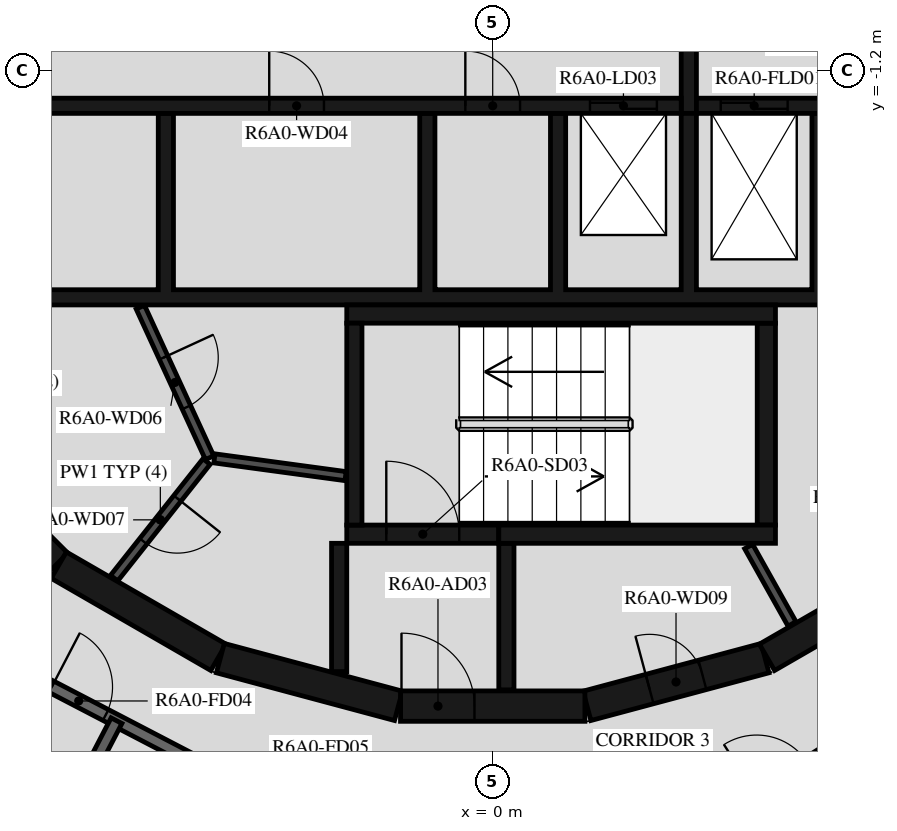
"""IFC4 building model, lengths in metres.
Left out: names, types, materials, properties, quantities, classifications, styles, units other than length and angle.
Written with IfcOpenShell. Run it as: python <this file> out.ifc"""

import sys

from ifc_helpers import new_model, si_unit, direction, frame, frame_2d, origin, place, context, subcontext, project, spatial, polyline, rectangle, outline, extrude, element, fill, save


model = new_model("IFC4")
c1 = context("Model", 3, precision=1e-05, world=origin(), true_north=direction((0.0, 1.0)))
c2 = subcontext(c1, "Body", "Model", "MODEL_VIEW")
j1 = project(units=[si_unit("LENGTHUNIT", "METRE"), si_unit("PLANEANGLEUNIT", "RADIAN")], contexts=[c1])
p1 = place(None, origin())
s1 = spatial("IfcSite", under=j1, at=p1, CompositionType="ELEMENT")
p2 = place(p1, origin())
s2 = spatial("IfcBuilding", under=s1, at=p2, CompositionType="ELEMENT")
p3 = place(p2, frame((0.0, 0.0, 226.7)))
s3 = spatial("IfcBuildingStorey", under=s2, at=p3, CompositionType="ELEMENT", Elevation=226.7)
p4 = place(p3, frame((1.55, -11.643, 0.0), z_axis=(0.0, 0.0, 1.0), x_axis=(0.965948410781, 0.258734743916, 0.0)))
e1 = element("IfcWall", 1, at=p4, inside=s3, PredefinedType="SHEAR", context=c2, shape_type="SweptSolid", body=[
    extrude(rectangle(XDim=3.033, YDim=0.5, at=frame_2d((1.516, 0.0))), origin(), (0.0, 0.0, 1.0), 3.12),
])
p5 = place(p4, frame((1.066, 0.0, 0.0)))
e2 = element("IfcOpeningElement", 2, at=p5, cuts=e1, PredefinedType="OPENING", context=c2, shape_type="SweptSolid", body=[
    extrude(rectangle(XDim=0.9, YDim=2.1, at=frame_2d((0.45, 1.05))), frame((0.0, 0.26, 0.0), z_axis=(0.0, -1.0, 0.0), x_axis=(1.0, 0.0, 0.0)), (0.0, 0.0, 1.0), 0.52),
])
p6 = place(p3, frame((4.51, -10.845, 0.0), z_axis=(0.0, 0.0, 1.0), x_axis=(0.865975092491, 0.500087131594, 0.0)))
e3 = element("IfcWall", 3, at=p6, inside=s3, PredefinedType="SHEAR", context=c2, shape_type="SweptSolid", body=[
    extrude(rectangle(XDim=3.033, YDim=0.5, at=frame_2d((1.516, 0.0))), origin(), (0.0, 0.0, 1.0), 3.12),
])
p7 = place(p3, frame((-9.308, -7.164, 0.0), z_axis=(0.0, 0.0, 1.0), x_axis=(0.707106781187, -0.707106781187, 0.0)))
e4 = element("IfcWall", 4, at=p7, inside=s3, PredefinedType="SHEAR", context=c2, shape_type="SweptSolid", body=[
    extrude(rectangle(XDim=3.032, YDim=0.5, at=frame_2d((1.516, 0.0))), origin(), (0.0, 0.0, 1.0), 3.12),
])
for number, where, z_axis, x_axis in (
    (5, (-7.137, -9.329, 0.0), (0.0, 0.0, 1.0), (0.866, -0.5, 0.0)),
    (6, (-4.479, -10.858, 0.0), (0.0, 0.0, 1.0), (0.966, -0.259, 0.0)),
):
    element("IfcWall", number, at=place(p3, frame(where, z_axis=z_axis, x_axis=x_axis)), inside=s3, PredefinedType="SHEAR", context=c2, shape_type="SweptSolid", body=[
        extrude(rectangle(XDim=3.033, YDim=0.5, at=frame_2d((1.516, 0.0))), origin(), (0.0, 0.0, 1.0), 3.12),
    ])
p8 = place(p3, frame((-1.516, -11.647, 0.0), z_axis=(0.0, 0.0, 1.0), x_axis=(1.0, 0.0, 0.0)))
e7 = element("IfcWall", 7, at=p8, inside=s3, PredefinedType="SHEAR", context=c2, shape_type="SweptSolid", body=[
    extrude(rectangle(XDim=3.033, YDim=0.5, at=frame_2d((1.516, 0.0))), origin(), (0.0, 0.0, 1.0), 3.12),
])
p9 = place(p8, frame((0.016, 0.0, 0.0)))
e8 = element("IfcOpeningElement", 8, at=p9, cuts=e7, PredefinedType="OPENING", context=c2, shape_type="SweptSolid", body=[
    extrude(rectangle(XDim=1.2, YDim=2.1, at=frame_2d((0.6, 1.05))), frame((0.0, 0.26, 0.0), z_axis=(0.0, -1.0, 0.0), x_axis=(1.0, 0.0, 0.0)), (0.0, 0.0, 1.0), 0.52),
])
p10 = place(p3, frame((-2.275, -8.67, 0.0), z_axis=(0.0, 0.0, 1.0), x_axis=(0.0, 1.0, 0.0)))
e9 = element("IfcWall", 9, at=p10, inside=s3, PredefinedType="SHEAR", context=c2, shape_type="SweptSolid", body=[
    extrude(rectangle(XDim=3.32, YDim=0.25, at=frame_2d((1.66, 0.0))), origin(), (0.0, 0.0, 1.0), 3.12),
])
p11 = place(p3, frame((-2.4, -5.2, 0.0), z_axis=(0.0, 0.0, 1.0), x_axis=(1.0, 0.0, 0.0)))
e10 = element("IfcWall", 10, at=p11, inside=s3, PredefinedType="SHEAR", context=c2, shape_type="SweptSolid", body=[
    extrude(rectangle(XDim=7.05, YDim=0.3, at=frame_2d((3.525, 0.0))), origin(), (0.0, 0.0, 1.0), 3.12),
])
p12 = place(p3, frame((4.5, -8.67, 0.0), z_axis=(0.0, 0.0, 1.0), x_axis=(0.0, 1.0, 0.0)))
e11 = element("IfcWall", 11, at=p12, inside=s3, PredefinedType="SHEAR", context=c2, shape_type="SweptSolid", body=[
    extrude(rectangle(XDim=3.32, YDim=0.3, at=frame_2d((1.66, 0.0))), origin(), (0.0, 0.0, 1.0), 3.12),
])
p13 = place(p3, frame((0.1, -8.82, 0.0), z_axis=(0.0, 0.0, 1.0), x_axis=(1.0, 0.0, 0.0)))
e12 = element("IfcWall", 12, at=p13, inside=s3, PredefinedType="SHEAR", context=c2, shape_type="SweptSolid", body=[
    extrude(rectangle(XDim=4.55, YDim=0.3, at=frame_2d((2.275, 0.0))), origin(), (0.0, 0.0, 1.0), 3.12),
])
p14 = place(p3, frame((-2.4, -8.82, 0.0), z_axis=(0.0, 0.0, 1.0), x_axis=(1.0, 0.0, 0.0)))
e13 = element("IfcWall", 13, at=p14, inside=s3, PredefinedType="SHEAR", context=c2, shape_type="SweptSolid", body=[
    extrude(rectangle(XDim=2.5, YDim=0.3, at=frame_2d((1.25, 0.0))), origin(), (0.0, 0.0, 1.0), 3.12),
])
p15 = place(p14, frame((0.65, 0.0, 0.0)))
e14 = element("IfcOpeningElement", 14, at=p15, cuts=e13, PredefinedType="OPENING", context=c2, shape_type="SweptSolid", body=[
    extrude(rectangle(XDim=1.2, YDim=2.1, at=frame_2d((0.6, 1.05))), frame((0.0, 0.16, 0.0), z_axis=(0.0, -1.0, 0.0), x_axis=(1.0, 0.0, 0.0)), (0.0, 0.0, 1.0), 0.32),
])
p16 = place(p3, frame((-2.525, -8.97, 0.0), z_axis=(0.0, 0.0, 1.0), x_axis=(0.0, -1.0, 0.0)))
e15 = element("IfcWall", 15, at=p16, inside=s3, PredefinedType="SHEAR", context=c2, shape_type="SweptSolid", body=[
    extrude(rectangle(XDim=2.11, YDim=0.25, at=frame_2d((1.055, 0.0))), origin(), (0.0, 0.0, 1.0), 3.12),
])
p17 = place(p3, frame((0.225, -8.97, 0.0), z_axis=(0.0, 0.0, 1.0), x_axis=(0.0, -1.0, 0.0)))
e16 = element("IfcWall", 16, at=p17, inside=s3, PredefinedType="SHEAR", context=c2, shape_type="SweptSolid", body=[
    extrude(rectangle(XDim=2.41, YDim=0.25, at=frame_2d((1.205, 0.0))), origin(), (0.0, 0.0, 1.0), 3.12),
])
p18 = place(p3, origin())
e17 = element("IfcWall", 17, at=p18, inside=s3, PredefinedType="SHEAR", context=c2, shape_type="SweptSolid", body=[
    extrude(outline(polyline([(9.8, -5.05), (9.8, -4.8), (9.8, -1.9), (9.55, -1.9), (9.55, -4.8), (7.65, -4.8), (7.65, -1.9), (7.4, -1.9), (7.4, -4.8), (5.5, -4.8), (5.5, -1.9), (5.25, -1.9), (5.25, -4.8), (3.35, -4.8), (3.35, -1.9), (3.1, -1.9), (3.1, -4.8), (1.2, -4.8), (1.2, -1.9), (0.95, -1.9), (0.95, -4.8), (-0.95, -4.8), (-0.95, -1.9), (-1.2, -1.9), (-1.2, -4.8), (-5.25, -4.8), (-5.25, -1.9), (-5.5, -1.9), (-5.5, -4.8), (-7.4, -4.8), (-7.4, -1.9), (-7.65, -1.9), (-7.65, -4.8), (-9.55, -4.8), (-9.55, -1.9), (-9.8, -1.9), (-9.8, -4.8), (-9.8, -5.05), (9.8, -5.05)])), origin(), (0.0, 0.0, 1.0), 3.12),
])
p19 = place(p3, frame((-11.28, -1.775, 0.0), z_axis=(0.0, 0.0, 1.0), x_axis=(1.0, 0.0, 0.0)))
e18 = element("IfcWall", 18, at=p19, inside=s3, PredefinedType="SHEAR", context=c2, shape_type="SweptSolid", body=[
    extrude(rectangle(XDim=14.38, YDim=0.25, at=frame_2d((7.19, 0.0))), origin(), (0.0, 0.0, 1.0), 3.12),
])
p20 = place(p19, frame((12.88, 0.0, 0.0)))
e19 = element("IfcOpeningElement", 19, at=p20, cuts=e18, PredefinedType="OPENING", context=c2, shape_type="SweptSolid", body=[
    extrude(rectangle(XDim=1.1, YDim=2.1, at=frame_2d((0.55, 1.05))), frame((0.0, 0.135, 0.0), z_axis=(0.0, -1.0, 0.0), x_axis=(1.0, 0.0, 0.0)), (0.0, 0.0, 1.0), 0.27),
])
p21 = place(p19, frame((7.605, 0.0, 0.0)))
e20 = element("IfcOpeningElement", 20, at=p21, cuts=e18, PredefinedType="OPENING", context=c2, shape_type="SweptSolid", body=[
    extrude(rectangle(XDim=0.9, YDim=2.1, at=frame_2d((0.45, 1.05))), frame((0.0, 0.135, 0.0), z_axis=(0.0, -1.0, 0.0), x_axis=(1.0, 0.0, 0.0)), (0.0, 0.0, 1.0), 0.27),
])
p22 = place(p19, frame((10.83, 0.0, 0.0)))
e21 = element("IfcOpeningElement", 21, at=p22, cuts=e18, PredefinedType="OPENING", context=c2, shape_type="SweptSolid", body=[
    extrude(rectangle(XDim=0.9, YDim=2.1, at=frame_2d((0.45, 1.05))), frame((0.0, 0.135, 0.0), z_axis=(0.0, -1.0, 0.0), x_axis=(1.0, 0.0, 0.0)), (0.0, 0.0, 1.0), 0.27),
])
p23 = place(p3, frame((3.35, -1.775, 0.0), z_axis=(0.0, 0.0, 1.0), x_axis=(1.0, 0.0, 0.0)))
e22 = element("IfcWall", 22, at=p23, inside=s3, PredefinedType="SHEAR", context=c2, shape_type="SweptSolid", body=[
    extrude(rectangle(XDim=7.93, YDim=0.25, at=frame_2d((3.965, 0.0))), origin(), (0.0, 0.0, 1.0), 3.12),
])
p24 = place(p23, frame((0.4, 0.0, 0.0)))
e23 = element("IfcOpeningElement", 23, at=p24, cuts=e22, PredefinedType="OPENING", context=c2, shape_type="SweptSolid", body=[
    extrude(rectangle(XDim=1.1, YDim=2.4, at=frame_2d((0.55, 1.2))), frame((0.0, 0.135, 0.0), z_axis=(0.0, -1.0, 0.0), x_axis=(1.0, 0.0, 0.0)), (0.0, 0.0, 1.0), 0.27),
])
p25 = place(p23, frame((2.55, 0.0, 0.0)))
e24 = element("IfcOpeningElement", 24, at=p25, cuts=e22, PredefinedType="OPENING", context=c2, shape_type="SweptSolid", body=[
    extrude(rectangle(XDim=1.1, YDim=2.4, at=frame_2d((0.55, 1.2))), frame((0.0, 0.135, 0.0), z_axis=(0.0, -1.0, 0.0), x_axis=(1.0, 0.0, 0.0)), (0.0, 0.0, 1.0), 0.27),
])
p26 = place(p23, frame((4.7, 0.0, 0.0)))
e25 = element("IfcOpeningElement", 25, at=p26, cuts=e22, PredefinedType="OPENING", context=c2, shape_type="SweptSolid", body=[
    extrude(rectangle(XDim=1.1, YDim=2.4, at=frame_2d((0.55, 1.2))), frame((0.0, 0.135, 0.0), z_axis=(0.0, -1.0, 0.0), x_axis=(1.0, 0.0, 0.0)), (0.0, 0.0, 1.0), 0.27),
])
p27 = place(p3, frame((3.225, -1.9, 0.0), z_axis=(0.0, 0.0, 1.0), x_axis=(0.0, 1.0, 0.0)))
e26 = element("IfcWall", 26, at=p27, inside=s3, PredefinedType="SHEAR", context=c2, shape_type="SweptSolid", body=[
    extrude(rectangle(XDim=3.8, YDim=0.25, at=frame_2d((1.9, 0.0))), origin(), (0.0, 0.0, 1.0), 3.12),
])
p28 = place(p3, frame((4.922, -10.296, 0.0), z_axis=(0.0, 0.0, 1.0), x_axis=(-0.48860846254, 0.872503163509, 0.0)))
e27 = element("IfcWall", 27, at=p28, inside=s3, PredefinedType="PARTITIONING", context=c2, shape_type="SweptSolid", body=[
    extrude(rectangle(XDim=1.459, YDim=0.15, at=frame_2d((0.73, 0.0))), origin(), (0.0, 0.0, 1.0), 3.12),
])
p29 = place(p3, frame((-5.795, -5.086, 0.0), z_axis=(0.0, 0.0, 1.0), x_axis=(0.417887867606, -0.908498613157, 0.0)))
e28 = element("IfcWall", 28, at=p29, inside=s3, PredefinedType="PARTITIONING", context=c2, shape_type="SweptSolid", body=[
    extrude(rectangle(XDim=2.726, YDim=0.15, at=frame_2d((1.363, 0.0))), origin(), (0.0, 0.0, 1.0), 3.12),
])
p30 = place(p29, frame((0.913, 0.0, 0.0)))
e29 = element("IfcOpeningElement", 29, at=p30, cuts=e28, PredefinedType="OPENING", context=c2, shape_type="SweptSolid", body=[
    extrude(rectangle(XDim=0.9, YDim=2.1, at=frame_2d((0.45, 1.05))), frame((0.0, 0.085, 0.0), z_axis=(0.0, -1.0, 0.0), x_axis=(1.0, 0.0, 0.0)), (0.0, 0.0, 1.0), 0.17),
])
p31 = place(p3, frame((-4.706, -7.625, 0.0), z_axis=(0.0, 0.0, 1.0), x_axis=(-0.621392599334, -0.783499353856, 0.0)))
e30 = element("IfcWall", 30, at=p31, inside=s3, PredefinedType="PARTITIONING", context=c2, shape_type="SweptSolid", body=[
    extrude(rectangle(XDim=2.447, YDim=0.15, at=frame_2d((1.224, 0.0))), origin(), (0.0, 0.0, 1.0), 3.12),
])
p32 = place(p31, frame((0.774, 0.0, 0.0)))
e31 = element("IfcOpeningElement", 31, at=p32, cuts=e30, PredefinedType="OPENING", context=c2, shape_type="SweptSolid", body=[
    extrude(rectangle(XDim=0.9, YDim=2.1, at=frame_2d((0.45, 1.05))), frame((0.0, 0.085, 0.0), z_axis=(0.0, -1.0, 0.0), x_axis=(1.0, 0.0, 0.0)), (0.0, 0.0, 1.0), 0.17),
])
p33 = place(p3, frame((-2.42, -7.865, 0.0), z_axis=(0.0, 0.0, 1.0), x_axis=(-0.990972299108, 0.134066783362, 0.0)))
e32 = element("IfcWall", 32, at=p33, inside=s3, PredefinedType="PARTITIONING", context=c2, shape_type="SweptSolid", body=[
    extrude(rectangle(XDim=2.176, YDim=0.15, at=frame_2d((1.088, 0.0))), origin(), (0.0, 0.0, 1.0), 3.12),
])
p34 = place(p3, frame((-9.372, -10.228, 0.0), z_axis=(0.0, 0.0, 1.0), x_axis=(0.887005184532, -0.461759464021, 0.0)))
e33 = element("IfcWall", 33, at=p34, inside=s3, PredefinedType="STANDARD", context=c2, shape_type="SweptSolid", body=[
    extrude(rectangle(XDim=7.181, YDim=0.2, at=frame_2d((3.591, 0.0))), origin(), (0.0, 0.0, 1.0), 3.12),
])
p35 = place(p34, frame((2.391, 0.0, 0.0)))
e34 = element("IfcOpeningElement", 34, at=p35, cuts=e33, PredefinedType="OPENING", context=c2, shape_type="SweptSolid", body=[
    extrude(rectangle(XDim=1.0, YDim=2.1, at=frame_2d((0.5, 1.05))), frame((0.0, 0.11, 0.0), z_axis=(0.0, -1.0, 0.0), x_axis=(1.0, 0.0, 0.0)), (0.0, 0.0, 1.0), 0.22),
])
p36 = place(p3, frame((4.172, -13.231, 0.0), z_axis=(0.0, 0.0, 1.0), x_axis=(0.843388394728, 0.537304397561, 0.0)))
e35 = element("IfcWall", 35, at=p36, inside=s3, PredefinedType="STANDARD", context=c2, shape_type="SweptSolid", body=[
    extrude(rectangle(XDim=7.181, YDim=0.2, at=frame_2d((3.59, 0.0))), origin(), (0.0, 0.0, 1.0), 3.12),
])
p37 = place(p36, frame((0.2, 0.0, 0.0)))
e36 = element("IfcOpeningElement", 36, at=p37, cuts=e35, PredefinedType="OPENING", context=c2, shape_type="SweptSolid", body=[
    extrude(rectangle(XDim=1.0, YDim=2.1, at=frame_2d((0.5, 1.05))), frame((0.0, 0.11, 0.0), z_axis=(0.0, -1.0, 0.0), x_axis=(1.0, 0.0, 0.0)), (0.0, 0.0, 1.0), 0.22),
])
p38 = place(p3, frame((-8.326, -15.996, 0.0), z_axis=(0.0, 0.0, 1.0), x_axis=(0.461739255077, 0.887015704664, 0.0)))
e37 = element("IfcWall", 37, at=p38, inside=s3, PredefinedType="STANDARD", context=c2, shape_type="SweptSolid", body=[
    extrude(rectangle(XDim=4.633, YDim=0.2, at=frame_2d((2.317, 0.0))), origin(), (0.0, 0.0, 1.0), 3.12),
])
p39 = place(p3, frame((-10.421, -11.373, 0.0), z_axis=(0.0, 0.0, 1.0), x_axis=(0.887006451745, -0.461757029792, 0.0)))
e38 = element("IfcWall", 38, at=p39, inside=s3, PredefinedType="PARTITIONING", context=c2, shape_type="SweptSolid", body=[
    extrude(rectangle(XDim=3.992, YDim=0.12, at=frame_2d((1.996, 0.0))), origin(), (0.0, 0.0, 1.0), 3.12),
])
p40 = place(p39, frame((0.639, 0.0, 0.0)))
e39 = element("IfcOpeningElement", 39, at=p40, cuts=e38, PredefinedType="OPENING", context=c2, shape_type="SweptSolid", body=[
    extrude(rectangle(XDim=0.9, YDim=2.1, at=frame_2d((0.45, 1.05))), frame((0.0, 0.07, 0.0), z_axis=(0.0, -1.0, 0.0), x_axis=(1.0, 0.0, 0.0)), (0.0, 0.0, 1.0), 0.14),
])
p41 = place(p3, frame((4.83, -14.59, 0.0), z_axis=(0.0, 0.0, 1.0), x_axis=(0.843393042763, 0.537297101629, 0.0)))
e40 = element("IfcWall", 40, at=p41, inside=s3, PredefinedType="PARTITIONING", context=c2, shape_type="SweptSolid", body=[
    extrude(rectangle(XDim=7.53, YDim=0.12, at=frame_2d((3.765, 0.0))), origin(), (0.0, 0.0, 1.0), 3.12),
])
p42 = place(p41, frame((0.2, 0.0, 0.0)))
e41 = element("IfcOpeningElement", 41, at=p42, cuts=e40, PredefinedType="OPENING", context=c2, shape_type="SweptSolid", body=[
    extrude(rectangle(XDim=0.9, YDim=2.1, at=frame_2d((0.45, 1.05))), frame((0.0, 0.07, 0.0), z_axis=(0.0, -1.0, 0.0), x_axis=(1.0, 0.0, 0.0)), (0.0, 0.0, 1.0), 0.14),
])
p43 = place(p15, origin())
e42 = element("IfcDoor", 42, at=p43, inside=s3, OperationType="SINGLE_SWING_LEFT", PredefinedType="DOOR", context=c2, shape_type="SweptSolid", body=[
    extrude(rectangle(XDim=1.2, YDim=2.1, at=frame_2d((0.6, 1.05))), frame((0.0, 0.025, 0.0), z_axis=(0.0, -1.0, 0.0), x_axis=(1.0, 0.0, 0.0)), (0.0, 0.0, 1.0), 0.05),
])
fill(e14, e42)
p44 = place(p9, origin())
e43 = element("IfcDoor", 43, at=p44, inside=s3, OperationType="SINGLE_SWING_RIGHT", PredefinedType="DOOR", context=c2, shape_type="SweptSolid", body=[
    extrude(rectangle(XDim=1.2, YDim=2.1, at=frame_2d((0.6, 1.05))), frame((0.0, 0.025, 0.0), z_axis=(0.0, -1.0, 0.0), x_axis=(1.0, 0.0, 0.0)), (0.0, 0.0, 1.0), 0.05),
])
fill(e8, e43)
p45 = place(p20, origin())
e44 = element("IfcDoor", 44, at=p45, inside=s3, OperationType="DOUBLE_DOOR_SLIDING", PredefinedType="DOOR", context=c2, shape_type="SweptSolid", body=[
    extrude(rectangle(XDim=1.1, YDim=2.1, at=frame_2d((0.55, 1.05))), frame((0.0, 0.025, 0.0), z_axis=(0.0, -1.0, 0.0), x_axis=(1.0, 0.0, 0.0)), (0.0, 0.0, 1.0), 0.05),
])
fill(e19, e44)
p46 = place(p24, origin())
e45 = element("IfcDoor", 45, at=p46, inside=s3, OperationType="DOUBLE_DOOR_SLIDING", PredefinedType="DOOR", context=c2, shape_type="SweptSolid", body=[
    extrude(rectangle(XDim=1.1, YDim=2.4, at=frame_2d((0.55, 1.2))), frame((0.0, 0.025, 0.0), z_axis=(0.0, -1.0, 0.0), x_axis=(1.0, 0.0, 0.0)), (0.0, 0.0, 1.0), 0.05),
])
fill(e23, e45)
p47 = place(p21, origin())
e46 = element("IfcDoor", 46, at=p47, inside=s3, OperationType="SINGLE_SWING_RIGHT", PredefinedType="DOOR", context=c2, shape_type="SweptSolid", body=[
    extrude(rectangle(XDim=0.9, YDim=2.1, at=frame_2d((0.45, 1.05))), frame((0.0, 0.025, 0.0), z_axis=(0.0, -1.0, 0.0), x_axis=(1.0, 0.0, 0.0)), (0.0, 0.0, 1.0), 0.05),
])
fill(e20, e46)
p48 = place(p22, origin())
e47 = element("IfcDoor", 47, at=p48, inside=s3, OperationType="SINGLE_SWING_LEFT", PredefinedType="DOOR", context=c2, shape_type="SweptSolid", body=[
    extrude(rectangle(XDim=0.9, YDim=2.1, at=frame_2d((0.45, 1.05))), frame((0.0, 0.025, 0.0), z_axis=(0.0, -1.0, 0.0), x_axis=(1.0, 0.0, 0.0)), (0.0, 0.0, 1.0), 0.05),
])
fill(e21, e47)
p49 = place(p30, origin())
e48 = element("IfcDoor", 48, at=p49, inside=s3, OperationType="SINGLE_SWING_RIGHT", PredefinedType="DOOR", context=c2, shape_type="SweptSolid", body=[
    extrude(rectangle(XDim=0.9, YDim=2.1, at=frame_2d((0.45, 1.05))), frame((0.0, 0.025, 0.0), z_axis=(0.0, -1.0, 0.0), x_axis=(1.0, 0.0, 0.0)), (0.0, 0.0, 1.0), 0.05),
])
fill(e29, e48)
p50 = place(p32, origin())
e49 = element("IfcDoor", 49, at=p50, inside=s3, OperationType="SINGLE_SWING_LEFT", PredefinedType="DOOR", context=c2, shape_type="SweptSolid", body=[
    extrude(rectangle(XDim=0.9, YDim=2.1, at=frame_2d((0.45, 1.05))), frame((0.0, 0.025, 0.0), z_axis=(0.0, -1.0, 0.0), x_axis=(1.0, 0.0, 0.0)), (0.0, 0.0, 1.0), 0.05),
])
fill(e31, e49)
p51 = place(p5, origin())
e50 = element("IfcDoor", 50, at=p51, inside=s3, OperationType="SINGLE_SWING_LEFT", PredefinedType="DOOR", context=c2, shape_type="SweptSolid", body=[
    extrude(rectangle(XDim=0.9, YDim=2.1, at=frame_2d((0.45, 1.05))), frame((0.0, 0.025, 0.0), z_axis=(0.0, -1.0, 0.0), x_axis=(1.0, 0.0, 0.0)), (0.0, 0.0, 1.0), 0.05),
])
fill(e2, e50)
p52 = place(p35, origin())
e51 = element("IfcDoor", 51, at=p52, inside=s3, OperationType="SINGLE_SWING_RIGHT", PredefinedType="DOOR", context=c2, shape_type="SweptSolid", body=[
    extrude(rectangle(XDim=1.0, YDim=2.1, at=frame_2d((0.5, 1.05))), frame((0.0, 0.025, 0.0), z_axis=(0.0, -1.0, 0.0), x_axis=(1.0, 0.0, 0.0)), (0.0, 0.0, 1.0), 0.05),
])
fill(e34, e51)
save(model, sys.argv[1])
